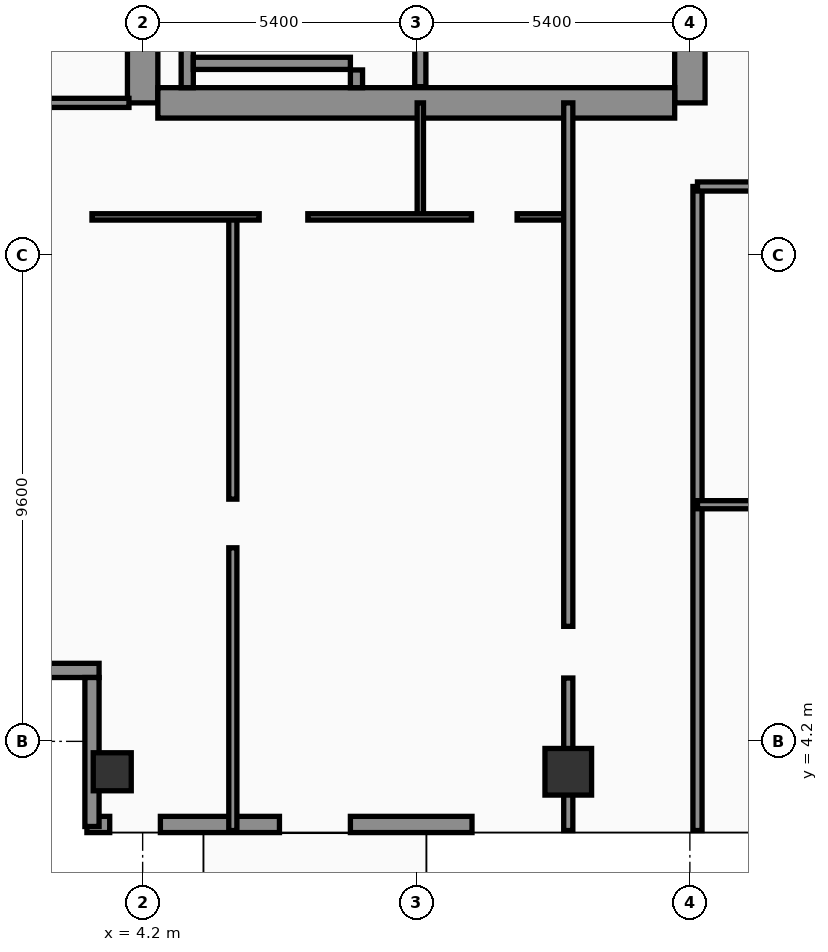
"""IFC4 building model, lengths in metres.
Left out: names, types, materials, properties, quantities, classifications, styles, units other than length and angle.
Written with IfcOpenShell. Run it as: python <this file> out.ifc"""

import sys

from ifc_helpers import new_model, si_unit, direction, frame, frame_2d, origin, origin_2d, place, context, subcontext, project, spatial, rectangle, hollow_rectangle, extrude, element, fill, save


model = new_model("IFC4")
c1 = context("Model", 3, precision=1e-05, world=origin(), true_north=direction((0.0, 1.0)))
c2 = subcontext(c1, "Body", "Model", "MODEL_VIEW")
j1 = project(units=[si_unit("LENGTHUNIT", "METRE"), si_unit("PLANEANGLEUNIT", "RADIAN")], contexts=[c1])
p1 = place(None, origin())
s1 = spatial("IfcSite", under=j1, at=p1, CompositionType="ELEMENT")
p2 = place(p1, origin())
s2 = spatial("IfcBuilding", under=s1, at=p2, CompositionType="ELEMENT")
p3 = place(p2, frame((0.0, 0.0, 291.1)))
s3 = spatial("IfcBuildingStorey", under=s2, at=p3, CompositionType="ELEMENT", Elevation=291.1)
p4 = place(p3, frame((4.2, 16.8, 0.0), z_axis=(0.0, 0.0, 1.0), x_axis=(0.0, 1.0, 0.0)))
e1 = element("IfcWall", 1, at=p4, inside=s3, PredefinedType="SHEAR", context=c2, shape_type="SweptSolid", body=[
    extrude(rectangle(XDim=21.6, YDim=0.6, at=frame_2d((10.8, 0.0))), origin(), (0.0, 0.0, 1.0), 3.56),
])
p5 = place(p3, frame((15.0, 16.8, 0.0), z_axis=(0.0, 0.0, 1.0), x_axis=(0.0, 1.0, 0.0)))
e2 = element("IfcWall", 2, at=p5, inside=s3, PredefinedType="SHEAR", context=c2, shape_type="SweptSolid", body=[
    extrude(rectangle(XDim=21.6, YDim=0.6, at=frame_2d((10.8, 0.0))), origin(), (0.0, 0.0, 1.0), 3.56),
])
p6 = place(p5, frame((8.65, 0.0, 0.0)))
e3 = element("IfcOpeningElement", 3, at=p6, cuts=e2, PredefinedType="OPENING", context=c2, shape_type="SweptSolid", body=[
    extrude(rectangle(XDim=1.1, YDim=2.2, at=frame_2d((0.55, 1.1))), frame((0.0, 0.31, 0.0), z_axis=(0.0, -1.0, 0.0), x_axis=(1.0, 0.0, 0.0)), (0.0, 0.0, 1.0), 0.62),
])
p7 = place(p5, frame((18.9, 0.0, 0.0)))
e4 = element("IfcOpeningElement", 4, at=p7, cuts=e2, PredefinedType="OPENING", context=c2, shape_type="SweptSolid", body=[
    extrude(rectangle(XDim=1.1, YDim=2.2, at=frame_2d((0.55, 1.1))), frame((0.0, 0.31, 0.0), z_axis=(0.0, -1.0, 0.0), x_axis=(1.0, 0.0, 0.0)), (0.0, 0.0, 1.0), 0.62),
])
p8 = place(p3, frame((4.5, 16.8, 0.0), z_axis=(0.0, 0.0, 1.0), x_axis=(1.0, 0.0, 0.0)))
e5 = element("IfcWall", 5, at=p8, inside=s3, PredefinedType="SHEAR", context=c2, shape_type="SweptSolid", body=[
    extrude(rectangle(XDim=10.2, YDim=0.6, at=frame_2d((5.1, 0.0))), origin(), (0.0, 0.0, 1.0), 3.56),
])
p9 = place(p3, frame((5.08, 17.1, 0.0), z_axis=(0.0, 0.0, 1.0), x_axis=(0.0, 1.0, 0.0)))
e6 = element("IfcWall", 6, at=p9, inside=s3, PredefinedType="SOLIDWALL", context=c2, shape_type="SweptSolid", body=[
    extrude(rectangle(XDim=9.69, YDim=0.24, at=frame_2d((4.845, 0.0))), origin(), (0.0, 0.0, 1.0), 3.56),
])
p10 = place(p3, frame((8.42, 17.1, 0.0), z_axis=(0.0, 0.0, 1.0), x_axis=(0.0, 1.0, 0.0)))
e7 = element("IfcWall", 7, at=p10, inside=s3, PredefinedType="SOLIDWALL", context=c2, shape_type="SweptSolid", body=[
    extrude(rectangle(XDim=9.69, YDim=0.24, at=frame_2d((4.845, 0.0))), origin(), (0.0, 0.0, 1.0), 3.56),
])
p11 = place(p10, frame((0.35, 0.0, 0.0)))
e8 = element("IfcOpeningElement", 8, at=p11, cuts=e7, PredefinedType="OPENING", context=c2, shape_type="SweptSolid", body=[
    extrude(rectangle(XDim=1.15, YDim=2.2, at=frame_2d((0.575, 1.1))), frame((0.0, 0.13, 0.0), z_axis=(0.0, -1.0, 0.0), x_axis=(1.0, 0.0, 0.0)), (0.0, 0.0, 1.0), 0.26),
])
p12 = place(p3, frame((5.2, 17.58, 0.0), z_axis=(0.0, 0.0, 1.0), x_axis=(1.0, 0.0, 0.0)))
e9 = element("IfcWall", 9, at=p12, inside=s3, PredefinedType="SOLIDWALL", context=c2, shape_type="SweptSolid", body=[
    extrude(rectangle(XDim=3.1, YDim=0.24, at=frame_2d((1.55, 0.0))), origin(), (0.0, 0.0, 1.0), 3.56),
])
p13 = place(p3, frame((3.6, 3.6, 0.0), z_axis=(0.0, 0.0, 1.0), x_axis=(1.0, 0.0, 0.0)))
e10 = element("IfcColumn", 10, at=p13, inside=s3, PredefinedType="COLUMN", context=c2, shape_type="SweptSolid", body=[
    extrude(hollow_rectangle(XDim=0.75, YDim=0.75, WallThickness=0.032, at=origin_2d()), origin(), (0.0, 0.0, 1.0), 3.56),
])
p14 = place(p3, frame((12.6, 3.6, 0.0), z_axis=(0.0, 0.0, 1.0), x_axis=(1.0, 0.0, 0.0)))
e11 = element("IfcColumn", 11, at=p14, inside=s3, PredefinedType="COLUMN", context=c2, shape_type="SweptSolid", body=[
    extrude(rectangle(XDim=0.92, YDim=0.92, at=origin_2d()), origin(), (0.0, 0.0, 1.0), 3.56),
])
p15 = place(p3, frame((3.1, 2.56, 0.0), z_axis=(0.0, 0.0, 1.0), x_axis=(1.0, 0.0, 0.0)))
e12 = element("IfcWall", 12, at=p15, inside=s3, PredefinedType="SOLIDWALL", context=c2, shape_type="SweptSolid", body=[
    extrude(rectangle(XDim=7.6, YDim=0.32, at=frame_2d((3.8, 0.0))), origin(), (0.0, 0.0, 1.0), 3.56),
])
p16 = place(p15, frame((0.45, 0.0, 0.75)))
e13 = element("IfcOpeningElement", 13, at=p16, cuts=e12, PredefinedType="OPENING", context=c2, shape_type="SweptSolid", body=[
    extrude(rectangle(XDim=1.0, YDim=1.6, at=frame_2d((0.5, 0.8))), frame((0.0, 0.17, 0.0), z_axis=(0.0, -1.0, 0.0), x_axis=(1.0, 0.0, 0.0)), (0.0, 0.0, 1.0), 0.34),
])
p17 = place(p15, frame((3.8, 0.0, 0.0)))
e14 = element("IfcOpeningElement", 14, at=p17, cuts=e12, PredefinedType="OPENING", context=c2, shape_type="SweptSolid", body=[
    extrude(rectangle(XDim=1.4, YDim=2.25, at=frame_2d((0.7, 1.125))), frame((0.0, 0.17, 0.0), z_axis=(0.0, -1.0, 0.0), x_axis=(1.0, 0.0, 0.0)), (0.0, 0.0, 1.0), 0.34),
])
p18 = place(p3, frame((0.12, 5.6, 0.0), z_axis=(0.0, 0.0, 1.0), x_axis=(1.0, 0.0, 0.0)))
e15 = element("IfcWall", 15, at=p18, inside=s3, PredefinedType="SOLIDWALL", context=c2, shape_type="SweptSolid", body=[
    extrude(rectangle(XDim=3.22, YDim=0.28, at=frame_2d((1.61, 0.0))), origin(), (0.0, 0.0, 1.0), 2.99),
])
p19 = place(p3, frame((3.2, 5.46, 0.0), z_axis=(0.0, 0.0, 1.0), x_axis=(0.0, -1.0, 0.0)))
e16 = element("IfcWall", 16, at=p19, inside=s3, PredefinedType="SOLIDWALL", context=c2, shape_type="SweptSolid", body=[
    extrude(rectangle(XDim=2.94, YDim=0.28, at=frame_2d((1.47, 0.0))), origin(), (0.0, 0.0, 1.0), 2.99),
])
p20 = place(p3, frame((9.68, 17.12, 0.0), z_axis=(0.0, 0.0, 1.0), x_axis=(0.0, 1.0, 0.0)))
e17 = element("IfcWall", 17, at=p20, inside=s3, PredefinedType="SOLIDWALL", context=c2, shape_type="SweptSolid", body=[
    extrude(rectangle(XDim=7.88, YDim=0.22, at=frame_2d((3.94, 0.0))), origin(), (0.0, 0.0, 1.0), 3.56),
])
p21 = place(p3, frame((0.08, 16.8, 0.0), z_axis=(0.0, 0.0, 1.0), x_axis=(1.0, 0.0, 0.0)))
e18 = element("IfcWall", 18, at=p21, inside=s3, PredefinedType="PARTITIONING", context=c2, shape_type="SweptSolid", body=[
    extrude(rectangle(XDim=3.85, YDim=0.18, at=frame_2d((1.925, 0.0))), origin(), (0.0, 0.0, 1.0), 2.99),
])
p22 = place(p3, frame((9.68, 14.55, 0.0), z_axis=(0.0, 0.0, 1.0), x_axis=(0.0, 1.0, 0.0)))
e19 = element("IfcWall", 19, at=p22, inside=s3, PredefinedType="PARTITIONING", context=c2, shape_type="SweptSolid", body=[
    extrude(rectangle(XDim=2.25, YDim=0.125, at=frame_2d((1.125, 0.0))), origin(), (0.0, 0.0, 1.0), 3.56),
])
p23 = place(p3, frame((5.98, 2.44, 0.0), z_axis=(0.0, 0.0, 1.0), x_axis=(0.0, 1.0, 0.0)))
e20 = element("IfcWall", 20, at=p23, inside=s3, PredefinedType="PARTITIONING", context=c2, shape_type="SweptSolid", body=[
    extrude(rectangle(XDim=12.11, YDim=0.16, at=frame_2d((6.055, 0.0))), origin(), (0.0, 0.0, 1.0), 3.09),
])
p24 = place(p23, frame((5.58, 0.0, 0.0)))
e21 = element("IfcOpeningElement", 21, at=p24, cuts=e20, PredefinedType="OPENING", context=c2, shape_type="SweptSolid", body=[
    extrude(rectangle(XDim=0.96, YDim=2.2, at=frame_2d((0.48, 1.1))), frame((0.0, 0.09, 0.0), z_axis=(0.0, -1.0, 0.0), x_axis=(1.0, 0.0, 0.0)), (0.0, 0.0, 1.0), 0.18),
])
p25 = place(p3, frame((3.2, 14.55, 0.0), z_axis=(0.0, 0.0, 1.0), x_axis=(1.0, 0.0, 0.0)))
e22 = element("IfcWall", 22, at=p25, inside=s3, PredefinedType="PARTITIONING", context=c2, shape_type="SweptSolid", body=[
    extrude(rectangle(XDim=9.4, YDim=0.125, at=frame_2d((4.7, 0.0))), origin(), (0.0, 0.0, 1.0), 2.99),
])
p26 = place(p25, frame((3.3, 0.0, 0.0)))
e23 = element("IfcOpeningElement", 23, at=p26, cuts=e22, PredefinedType="OPENING", context=c2, shape_type="SweptSolid", body=[
    extrude(rectangle(XDim=0.96, YDim=2.2, at=frame_2d((0.48, 1.1))), frame((0.0, 0.073, 0.0), z_axis=(0.0, -1.0, 0.0), x_axis=(1.0, 0.0, 0.0)), (0.0, 0.0, 1.0), 0.145),
])
p27 = place(p25, frame((7.49, 0.0, 0.0)))
e24 = element("IfcOpeningElement", 24, at=p27, cuts=e22, PredefinedType="OPENING", context=c2, shape_type="SweptSolid", body=[
    extrude(rectangle(XDim=0.9, YDim=2.15, at=frame_2d((0.45, 1.075))), frame((0.0, 0.073, 0.0), z_axis=(0.0, -1.0, 0.0), x_axis=(1.0, 0.0, 0.0)), (0.0, 0.0, 1.0), 0.145),
])
p28 = place(p3, frame((12.6, 2.44, 0.0), z_axis=(0.0, 0.0, 1.0), x_axis=(0.0, 1.0, 0.0)))
e25 = element("IfcWall", 25, at=p28, inside=s3, PredefinedType="PARTITIONING", context=c2, shape_type="SweptSolid", body=[
    extrude(rectangle(XDim=14.36, YDim=0.18, at=frame_2d((7.18, 0.0))), origin(), (0.0, 0.0, 1.0), 2.99),
])
p29 = place(p28, frame((3.01, 0.0, 0.0)))
e26 = element("IfcOpeningElement", 26, at=p29, cuts=e25, PredefinedType="OPENING", context=c2, shape_type="SweptSolid", body=[
    extrude(rectangle(XDim=1.02, YDim=2.2, at=frame_2d((0.51, 1.1))), frame((0.0, 0.1, 0.0), z_axis=(0.0, -1.0, 0.0), x_axis=(1.0, 0.0, 0.0)), (0.0, 0.0, 1.0), 0.2),
])
p30 = place(p3, frame((15.15, 2.44, 0.0), z_axis=(0.0, 0.0, 1.0), x_axis=(0.0, 1.0, 0.0)))
e27 = element("IfcWall", 27, at=p30, inside=s3, PredefinedType="PARTITIONING", context=c2, shape_type="SweptSolid", body=[
    extrude(rectangle(XDim=12.71, YDim=0.18, at=frame_2d((6.355, 0.0))), origin(), (0.0, 0.0, 1.0), 3.09),
])
p31 = place(p3, frame((15.15, 8.87, 0.0), z_axis=(0.0, 0.0, 1.0), x_axis=(1.0, 0.0, 0.0)))
e28 = element("IfcWall", 28, at=p31, inside=s3, PredefinedType="PARTITIONING", context=c2, shape_type="SweptSolid", body=[
    extrude(rectangle(XDim=4.45, YDim=0.16, at=frame_2d((2.225, 0.0))), origin(), (0.0, 0.0, 1.0), 3.56),
])
p32 = place(p31, frame((1.75, 0.0, 0.0)))
e29 = element("IfcOpeningElement", 29, at=p32, cuts=e28, PredefinedType="OPENING", context=c2, shape_type="SweptSolid", body=[
    extrude(rectangle(XDim=0.96, YDim=2.2, at=frame_2d((0.48, 1.1))), frame((0.0, 0.09, 0.0), z_axis=(0.0, -1.0, 0.0), x_axis=(1.0, 0.0, 0.0)), (0.0, 0.0, 1.0), 0.18),
])
p33 = place(p3, frame((15.15, 15.15, 0.0), z_axis=(0.0, 0.0, 1.0), x_axis=(1.0, 0.0, 0.0)))
e30 = element("IfcWall", 30, at=p33, inside=s3, PredefinedType="PARTITIONING", context=c2, shape_type="SweptSolid", body=[
    extrude(rectangle(XDim=6.45, YDim=0.18, at=frame_2d((3.225, 0.0))), origin(), (0.0, 0.0, 1.0), 2.59),
])
p34 = place(p33, frame((1.74, 0.0, 0.0)))
e31 = element("IfcOpeningElement", 31, at=p34, cuts=e30, PredefinedType="OPENING", context=c2, shape_type="SweptSolid", body=[
    extrude(rectangle(XDim=1.02, YDim=2.2, at=frame_2d((0.51, 1.1))), frame((0.0, 0.1, 0.0), z_axis=(0.0, -1.0, 0.0), x_axis=(1.0, 0.0, 0.0)), (0.0, 0.0, 1.0), 0.2),
])
p35 = place(p16, origin())
e32 = element("IfcWindow", 32, at=p35, inside=s3, PartitioningType="SINGLE_PANEL", PredefinedType="WINDOW", context=c2, shape_type="SweptSolid", body=[
    extrude(rectangle(XDim=1.0, YDim=1.6, at=frame_2d((0.5, 0.8))), frame((0.0, 0.03, 0.0), z_axis=(0.0, -1.0, 0.0), x_axis=(1.0, 0.0, 0.0)), (0.0, 0.0, 1.0), 0.06),
])
fill(e13, e32)
p36 = place(p17, origin())
e33 = element("IfcDoor", 33, at=p36, inside=s3, OperationType="SINGLE_SWING_LEFT", PredefinedType="DOOR", context=c2, shape_type="SweptSolid", body=[
    extrude(rectangle(XDim=1.4, YDim=2.25, at=frame_2d((0.7, 1.125))), frame((0.0, 0.025, 0.0), z_axis=(0.0, -1.0, 0.0), x_axis=(1.0, 0.0, 0.0)), (0.0, 0.0, 1.0), 0.05),
])
fill(e14, e33)
p37 = place(p24, origin())
e34 = element("IfcDoor", 34, at=p37, inside=s3, OperationType="SINGLE_SWING_LEFT", PredefinedType="DOOR", context=c2, shape_type="SweptSolid", body=[
    extrude(rectangle(XDim=0.96, YDim=2.2, at=frame_2d((0.48, 1.1))), frame((0.0, 0.025, 0.0), z_axis=(0.0, -1.0, 0.0), x_axis=(1.0, 0.0, 0.0)), (0.0, 0.0, 1.0), 0.05),
])
fill(e21, e34)
p38 = place(p26, origin())
e35 = element("IfcDoor", 35, at=p38, inside=s3, OperationType="SINGLE_SWING_LEFT", PredefinedType="DOOR", context=c2, shape_type="SweptSolid", body=[
    extrude(rectangle(XDim=0.96, YDim=2.2, at=frame_2d((0.48, 1.1))), frame((0.0, 0.025, 0.0), z_axis=(0.0, -1.0, 0.0), x_axis=(1.0, 0.0, 0.0)), (0.0, 0.0, 1.0), 0.05),
])
fill(e23, e35)
p39 = place(p27, origin())
e36 = element("IfcDoor", 36, at=p39, inside=s3, OperationType="SINGLE_SWING_RIGHT", PredefinedType="DOOR", context=c2, shape_type="SweptSolid", body=[
    extrude(rectangle(XDim=0.9, YDim=2.15, at=frame_2d((0.45, 1.075))), frame((0.0, 0.025, 0.0), z_axis=(0.0, -1.0, 0.0), x_axis=(1.0, 0.0, 0.0)), (0.0, 0.0, 1.0), 0.05),
])
fill(e24, e36)
p40 = place(p29, origin())
e37 = element("IfcDoor", 37, at=p40, inside=s3, OperationType="SINGLE_SWING_LEFT", PredefinedType="DOOR", context=c2, shape_type="SweptSolid", body=[
    extrude(rectangle(XDim=1.02, YDim=2.2, at=frame_2d((0.51, 1.1))), frame((0.0, 0.025, 0.0), z_axis=(0.0, -1.0, 0.0), x_axis=(1.0, 0.0, 0.0)), (0.0, 0.0, 1.0), 0.05),
])
fill(e26, e37)
p41 = place(p11, origin())
e38 = element("IfcDoor", 38, at=p41, inside=s3, OperationType="SINGLE_SWING_LEFT", PredefinedType="DOOR", context=c2, shape_type="SweptSolid", body=[
    extrude(rectangle(XDim=1.15, YDim=2.2, at=frame_2d((0.575, 1.1))), frame((0.0, 0.025, 0.0), z_axis=(0.0, -1.0, 0.0), x_axis=(1.0, 0.0, 0.0)), (0.0, 0.0, 1.0), 0.05),
])
fill(e8, e38)
save(model, sys.argv[1])
